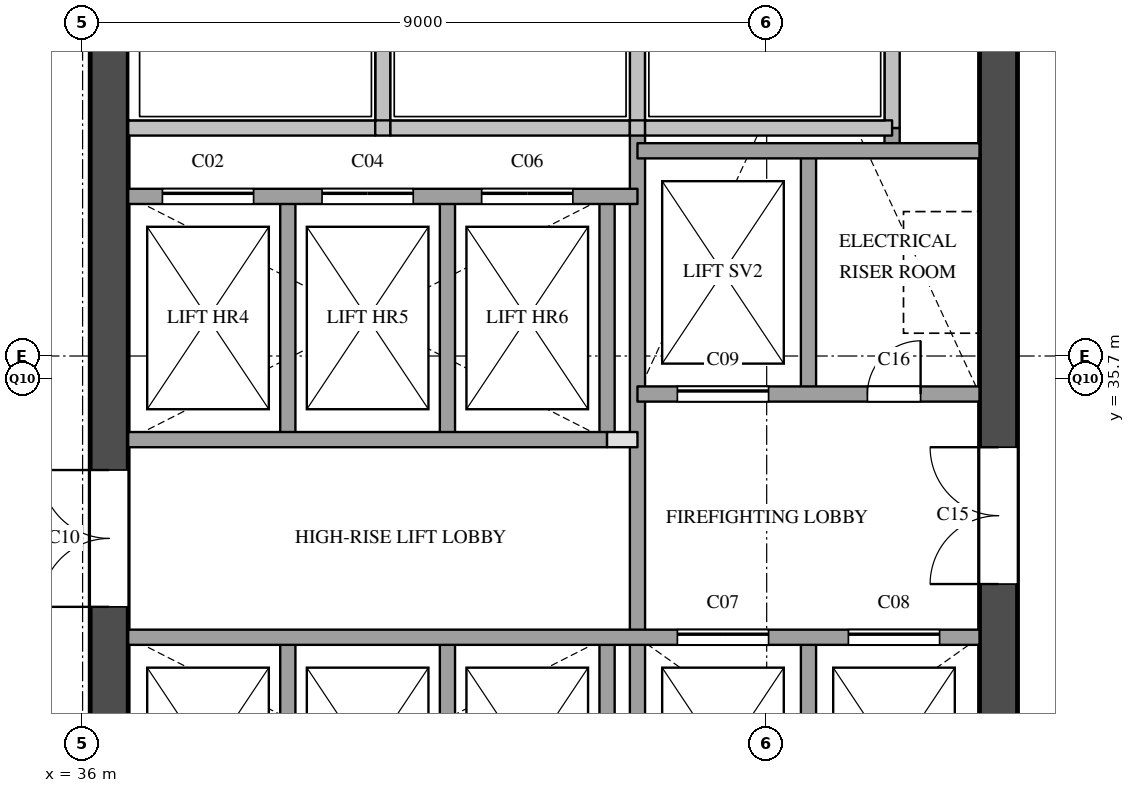
"""IFC4 building model, lengths in metres.
Left out: names, types, materials, properties, quantities, classifications, styles, units other than length and angle.
Written with IfcOpenShell. Run it as: python <this file> out.ifc"""

import sys

from ifc_helpers import new_model, si_unit, direction, frame, frame_2d, origin, place, context, subcontext, project, spatial, rectangle, extrude, element, fill, save


model = new_model("IFC4")
c1 = context("Model", 3, precision=1e-05, world=origin(), true_north=direction((0.0, 1.0)))
c2 = subcontext(c1, "Body", "Model", "MODEL_VIEW")
j1 = project(units=[si_unit("LENGTHUNIT", "METRE"), si_unit("PLANEANGLEUNIT", "RADIAN")], contexts=[c1])
p1 = place(None, origin())
s1 = spatial("IfcSite", under=j1, at=p1, CompositionType="ELEMENT")
p2 = place(p1, origin())
s2 = spatial("IfcBuilding", under=s1, at=p2, CompositionType="ELEMENT")
p3 = place(p2, frame((0.0, 0.0, 154.4)))
s3 = spatial("IfcBuildingStorey", under=s2, at=p3, CompositionType="ELEMENT", Elevation=154.4)
p4 = place(p3, frame((36.35, 29.1, 0.0), z_axis=(0.0, 0.0, 1.0), x_axis=(0.0, 1.0, 0.0)))
e1 = element("IfcWall", 1, at=p4, inside=s3, PredefinedType="SHEAR", context=c2, shape_type="SweptSolid", body=[
    extrude(rectangle(XDim=20.3, YDim=0.5, at=frame_2d((10.15, 0.0))), origin(), (0.0, 0.0, 1.0), 3.6),
])
p5 = place(p4, frame((3.6, 0.0, 0.0)))
e2 = element("IfcOpeningElement", 2, at=p5, cuts=e1, PredefinedType="OPENING", context=c2, shape_type="SweptSolid", body=[
    extrude(rectangle(XDim=1.8, YDim=2.1, at=frame_2d((0.9, 1.05))), frame((0.0, 0.26, 0.0), z_axis=(0.0, -1.0, 0.0), x_axis=(1.0, 0.0, 0.0)), (0.0, 0.0, 1.0), 0.52),
])
p6 = place(p4, frame((16.4, 0.0, 0.0)))
e3 = element("IfcOpeningElement", 3, at=p6, cuts=e1, PredefinedType="OPENING", context=c2, shape_type="SweptSolid", body=[
    extrude(rectangle(XDim=1.0, YDim=2.1, at=frame_2d((0.5, 1.05))), frame((0.0, 0.26, 0.0), z_axis=(0.0, -1.0, 0.0), x_axis=(1.0, 0.0, 0.0)), (0.0, 0.0, 1.0), 0.52),
])
p7 = place(p3, frame((48.05, 29.1, 0.0), z_axis=(0.0, 0.0, 1.0), x_axis=(0.0, 1.0, 0.0)))
e4 = element("IfcWall", 4, at=p7, inside=s3, PredefinedType="SHEAR", context=c2, shape_type="SweptSolid", body=[
    extrude(rectangle(XDim=20.3, YDim=0.5, at=frame_2d((10.15, 0.0))), origin(), (0.0, 0.0, 1.0), 3.6),
])
p8 = place(p7, frame((12.5, 0.0, 0.0)))
e5 = element("IfcOpeningElement", 5, at=p8, cuts=e4, PredefinedType="OPENING", context=c2, shape_type="SweptSolid", body=[
    extrude(rectangle(XDim=0.7, YDim=2.1, at=frame_2d((0.35, 1.05))), frame((0.0, 0.26, 0.0), z_axis=(0.0, -1.0, 0.0), x_axis=(1.0, 0.0, 0.0)), (0.0, 0.0, 1.0), 0.52),
])
p9 = place(p7, frame((3.9, 0.0, 0.0)))
e6 = element("IfcOpeningElement", 6, at=p9, cuts=e4, PredefinedType="OPENING", context=c2, shape_type="SweptSolid", body=[
    extrude(rectangle(XDim=1.8, YDim=2.1, at=frame_2d((0.9, 1.05))), frame((0.0, 0.26, 0.0), z_axis=(0.0, -1.0, 0.0), x_axis=(1.0, 0.0, 0.0)), (0.0, 0.0, 1.0), 0.52),
])
p10 = place(p3, frame((38.7, 29.1, 0.0), z_axis=(0.0, 0.0, 1.0), x_axis=(0.0, 1.0, 0.0)))
e7 = element("IfcWall", 7, at=p10, inside=s3, PredefinedType="SOLIDWALL", context=c2, shape_type="SweptSolid", body=[
    extrude(rectangle(XDim=3.2, YDim=0.2, at=frame_2d((1.6, 0.0))), origin(), (0.0, 0.0, 1.0), 3.6),
])
p11 = place(p3, frame((38.7, 34.9, 0.0), z_axis=(0.0, 0.0, 1.0), x_axis=(0.0, 1.0, 0.0)))
e8 = element("IfcWall", 8, at=p11, inside=s3, PredefinedType="SOLIDWALL", context=c2, shape_type="SweptSolid", body=[
    extrude(rectangle(XDim=3.2, YDim=0.2, at=frame_2d((1.6, 0.0))), origin(), (0.0, 0.0, 1.0), 3.6),
])
p12 = place(p3, frame((39.95, 39.0, 0.0), z_axis=(0.0, 0.0, 1.0), x_axis=(0.0, 1.0, 0.0)))
e9 = element("IfcWall", 9, at=p12, inside=s3, PredefinedType="SOLIDWALL", context=c2, shape_type="SweptSolid", body=[
    extrude(rectangle(XDim=1.78, YDim=0.2, at=frame_2d((0.89, 0.0))), origin(), (0.0, 0.0, 1.0), 3.6),
])
p13 = place(p3, frame((40.8, 29.1, 0.0), z_axis=(0.0, 0.0, 1.0), x_axis=(0.0, 1.0, 0.0)))
e10 = element("IfcWall", 10, at=p13, inside=s3, PredefinedType="SOLIDWALL", context=c2, shape_type="SweptSolid", body=[
    extrude(rectangle(XDim=3.2, YDim=0.2, at=frame_2d((1.6, 0.0))), origin(), (0.0, 0.0, 1.0), 3.6),
])
p14 = place(p3, frame((40.8, 34.9, 0.0), z_axis=(0.0, 0.0, 1.0), x_axis=(0.0, 1.0, 0.0)))
e11 = element("IfcWall", 11, at=p14, inside=s3, PredefinedType="SOLIDWALL", context=c2, shape_type="SweptSolid", body=[
    extrude(rectangle(XDim=3.2, YDim=0.2, at=frame_2d((1.6, 0.0))), origin(), (0.0, 0.0, 1.0), 3.6),
])
p15 = place(p3, frame((42.9, 29.1, 0.0), z_axis=(0.0, 0.0, 1.0), x_axis=(0.0, 1.0, 0.0)))
e12 = element("IfcWall", 12, at=p15, inside=s3, PredefinedType="SOLIDWALL", context=c2, shape_type="SweptSolid", body=[
    extrude(rectangle(XDim=3.2, YDim=0.2, at=frame_2d((1.6, 0.0))), origin(), (0.0, 0.0, 1.0), 3.6),
])
p16 = place(p3, frame((42.9, 34.9, 0.0), z_axis=(0.0, 0.0, 1.0), x_axis=(0.0, 1.0, 0.0)))
e13 = element("IfcWall", 13, at=p16, inside=s3, PredefinedType="SOLIDWALL", context=c2, shape_type="SweptSolid", body=[
    extrude(rectangle(XDim=3.2, YDim=0.2, at=frame_2d((1.6, 0.0))), origin(), (0.0, 0.0, 1.0), 3.6),
])
p17 = place(p3, frame((43.3, 29.1, 0.0), z_axis=(0.0, 0.0, 1.0), x_axis=(0.0, 1.0, 0.0)))
e14 = element("IfcWall", 14, at=p17, inside=s3, PredefinedType="SOLIDWALL", context=c2, shape_type="SweptSolid", body=[
    extrude(rectangle(XDim=9.9, YDim=0.2, at=frame_2d((4.95, 0.0))), origin(), (0.0, 0.0, 1.0), 3.6),
])
p18 = place(p3, frame((43.3, 39.0, 0.0), z_axis=(0.0, 0.0, 1.0), x_axis=(0.0, 1.0, 0.0)))
e15 = element("IfcWall", 15, at=p18, inside=s3, PredefinedType="SOLIDWALL", context=c2, shape_type="SweptSolid", body=[
    extrude(rectangle(XDim=1.78, YDim=0.2, at=frame_2d((0.89, 0.0))), origin(), (0.0, 0.0, 1.0), 3.6),
])
for number, where, z_axis, x_axis in (
    (16, (45.55, 29.1, 0.0), (0.0, 0.0, 1.0), (0.0, 1.0, 0.0)),
    (17, (45.55, 35.5, 0.0), (0.0, 0.0, 1.0), (0.0, 1.0, 0.0)),
):
    element("IfcWall", number, at=place(p3, frame(where, z_axis=z_axis, x_axis=x_axis)), inside=s3, PredefinedType="SOLIDWALL", context=c2, shape_type="SweptSolid", body=[
        extrude(rectangle(XDim=3.2, YDim=0.2, at=frame_2d((1.6, 0.0))), origin(), (0.0, 0.0, 1.0), 3.6),
    ])
p19 = place(p3, frame((46.65, 38.7, 0.0), z_axis=(0.0, 0.0, 1.0), x_axis=(0.0, 1.0, 0.0)))
e18 = element("IfcWall", 18, at=p19, inside=s3, PredefinedType="SOLIDWALL", context=c2, shape_type="SweptSolid", body=[
    extrude(rectangle(XDim=0.3, YDim=0.2, at=frame_2d((0.15, 0.0))), origin(), (0.0, 0.0, 1.0), 3.6),
])
p20 = place(p3, frame((46.65, 39.0, 0.0), z_axis=(0.0, 0.0, 1.0), x_axis=(0.0, 1.0, 0.0)))
e19 = element("IfcWall", 19, at=p20, inside=s3, PredefinedType="SOLIDWALL", context=c2, shape_type="SweptSolid", body=[
    extrude(rectangle(XDim=1.78, YDim=0.2, at=frame_2d((0.89, 0.0))), origin(), (0.0, 0.0, 1.0), 3.6),
])
p21 = place(p3, frame((36.6, 32.3, 0.0), z_axis=(0.0, 0.0, 1.0), x_axis=(1.0, 0.0, 0.0)))
e20 = element("IfcWall", 20, at=p21, inside=s3, PredefinedType="SOLIDWALL", context=c2, shape_type="SweptSolid", body=[
    extrude(rectangle(XDim=11.2, YDim=0.2, at=frame_2d((5.6, 0.0))), origin(), (0.0, 0.0, 1.0), 3.6),
])
p22 = place(p21, frame((7.225, 0.0, 0.0)))
e21 = element("IfcOpeningElement", 21, at=p22, cuts=e20, PredefinedType="OPENING", context=c2, shape_type="SweptSolid", body=[
    extrude(rectangle(XDim=1.2, YDim=2.1, at=frame_2d((0.6, 1.05))), frame((0.0, 0.11, 0.0), z_axis=(0.0, -1.0, 0.0), x_axis=(1.0, 0.0, 0.0)), (0.0, 0.0, 1.0), 0.22),
])
p23 = place(p21, frame((9.475, 0.0, 0.0)))
e22 = element("IfcOpeningElement", 22, at=p23, cuts=e20, PredefinedType="OPENING", context=c2, shape_type="SweptSolid", body=[
    extrude(rectangle(XDim=1.2, YDim=2.1, at=frame_2d((0.6, 1.05))), frame((0.0, 0.11, 0.0), z_axis=(0.0, -1.0, 0.0), x_axis=(1.0, 0.0, 0.0)), (0.0, 0.0, 1.0), 0.22),
])
p24 = place(p3, frame((42.9, 34.9, 0.0), z_axis=(0.0, 0.0, 1.0), x_axis=(1.0, 0.0, 0.0)))
e23 = element("IfcWall", 23, at=p24, inside=s3, PredefinedType="PARTITIONING", context=c2, shape_type="SweptSolid", body=[
    extrude(rectangle(XDim=0.4, YDim=0.2, at=frame_2d((0.2, 0.0))), origin(), (0.0, 0.0, 1.0), 3.6),
])
p25 = place(p3, frame((36.6, 34.9, 0.0), z_axis=(0.0, 0.0, 1.0), x_axis=(1.0, 0.0, 0.0)))
e24 = element("IfcWall", 24, at=p25, inside=s3, PredefinedType="SOLIDWALL", context=c2, shape_type="SweptSolid", body=[
    extrude(rectangle(XDim=6.3, YDim=0.2, at=frame_2d((3.15, 0.0))), origin(), (0.0, 0.0, 1.0), 3.6),
])
p26 = place(p3, frame((43.3, 35.5, 0.0), z_axis=(0.0, 0.0, 1.0), x_axis=(1.0, 0.0, 0.0)))
e25 = element("IfcWall", 25, at=p26, inside=s3, PredefinedType="SOLIDWALL", context=c2, shape_type="SweptSolid", body=[
    extrude(rectangle(XDim=4.5, YDim=0.2, at=frame_2d((2.25, 0.0))), origin(), (0.0, 0.0, 1.0), 3.6),
])
p27 = place(p26, frame((0.525, 0.0, 0.0)))
e26 = element("IfcOpeningElement", 26, at=p27, cuts=e25, PredefinedType="OPENING", context=c2, shape_type="SweptSolid", body=[
    extrude(rectangle(XDim=1.2, YDim=2.1, at=frame_2d((0.6, 1.05))), frame((0.0, 0.11, 0.0), z_axis=(0.0, -1.0, 0.0), x_axis=(1.0, 0.0, 0.0)), (0.0, 0.0, 1.0), 0.22),
])
p28 = place(p26, frame((3.025, 0.0, 0.0)))
e27 = element("IfcOpeningElement", 27, at=p28, cuts=e25, PredefinedType="OPENING", context=c2, shape_type="SweptSolid", body=[
    extrude(rectangle(XDim=0.7, YDim=2.1, at=frame_2d((0.35, 1.05))), frame((0.0, 0.11, 0.0), z_axis=(0.0, -1.0, 0.0), x_axis=(1.0, 0.0, 0.0)), (0.0, 0.0, 1.0), 0.22),
])
p29 = place(p3, frame((36.6, 38.1, 0.0), z_axis=(0.0, 0.0, 1.0), x_axis=(1.0, 0.0, 0.0)))
e28 = element("IfcWall", 28, at=p29, inside=s3, PredefinedType="SOLIDWALL", context=c2, shape_type="SweptSolid", body=[
    extrude(rectangle(XDim=6.7, YDim=0.2, at=frame_2d((3.35, 0.0))), origin(), (0.0, 0.0, 1.0), 3.6),
])
p30 = place(p29, frame((0.45, 0.0, 0.0)))
e29 = element("IfcOpeningElement", 29, at=p30, cuts=e28, PredefinedType="OPENING", context=c2, shape_type="SweptSolid", body=[
    extrude(rectangle(XDim=1.2, YDim=2.1, at=frame_2d((0.6, 1.05))), frame((0.0, 0.11, 0.0), z_axis=(0.0, -1.0, 0.0), x_axis=(1.0, 0.0, 0.0)), (0.0, 0.0, 1.0), 0.22),
])
p31 = place(p29, frame((2.55, 0.0, 0.0)))
e30 = element("IfcOpeningElement", 30, at=p31, cuts=e28, PredefinedType="OPENING", context=c2, shape_type="SweptSolid", body=[
    extrude(rectangle(XDim=1.2, YDim=2.1, at=frame_2d((0.6, 1.05))), frame((0.0, 0.11, 0.0), z_axis=(0.0, -1.0, 0.0), x_axis=(1.0, 0.0, 0.0)), (0.0, 0.0, 1.0), 0.22),
])
p32 = place(p29, frame((4.65, 0.0, 0.0)))
e31 = element("IfcOpeningElement", 31, at=p32, cuts=e28, PredefinedType="OPENING", context=c2, shape_type="SweptSolid", body=[
    extrude(rectangle(XDim=1.2, YDim=2.1, at=frame_2d((0.6, 1.05))), frame((0.0, 0.11, 0.0), z_axis=(0.0, -1.0, 0.0), x_axis=(1.0, 0.0, 0.0)), (0.0, 0.0, 1.0), 0.22),
])
p33 = place(p3, frame((43.3, 38.7, 0.0), z_axis=(0.0, 0.0, 1.0), x_axis=(1.0, 0.0, 0.0)))
e32 = element("IfcWall", 32, at=p33, inside=s3, PredefinedType="SOLIDWALL", context=c2, shape_type="SweptSolid", body=[
    extrude(rectangle(XDim=4.5, YDim=0.2, at=frame_2d((2.25, 0.0))), origin(), (0.0, 0.0, 1.0), 3.6),
])
p34 = place(p3, frame((36.6, 39.0, 0.0), z_axis=(0.0, 0.0, 1.0), x_axis=(1.0, 0.0, 0.0)))
e33 = element("IfcWall", 33, at=p34, inside=s3, PredefinedType="SOLIDWALL", context=c2, shape_type="SweptSolid", body=[
    extrude(rectangle(XDim=3.25, YDim=0.2, at=frame_2d((1.625, 0.0))), origin(), (0.0, 0.0, 1.0), 3.6),
])
p35 = place(p3, frame((39.85, 39.0, 0.0), z_axis=(0.0, 0.0, 1.0), x_axis=(1.0, 0.0, 0.0)))
e34 = element("IfcWall", 34, at=p35, inside=s3, PredefinedType="SOLIDWALL", context=c2, shape_type="SweptSolid", body=[
    extrude(rectangle(XDim=0.2, YDim=0.2, at=frame_2d((0.1, 0.0))), origin(), (0.0, 0.0, 1.0), 3.6),
])
p36 = place(p3, frame((40.05, 39.0, 0.0), z_axis=(0.0, 0.0, 1.0), x_axis=(1.0, 0.0, 0.0)))
e35 = element("IfcWall", 35, at=p36, inside=s3, PredefinedType="SOLIDWALL", context=c2, shape_type="SweptSolid", body=[
    extrude(rectangle(XDim=3.15, YDim=0.2, at=frame_2d((1.575, 0.0))), origin(), (0.0, 0.0, 1.0), 3.6),
])
p37 = place(p3, frame((43.2, 39.0, 0.0), z_axis=(0.0, 0.0, 1.0), x_axis=(1.0, 0.0, 0.0)))
e36 = element("IfcWall", 36, at=p37, inside=s3, PredefinedType="SOLIDWALL", context=c2, shape_type="SweptSolid", body=[
    extrude(rectangle(XDim=0.2, YDim=0.2, at=frame_2d((0.1, 0.0))), origin(), (0.0, 0.0, 1.0), 3.6),
])
p38 = place(p3, frame((43.4, 39.0, 0.0), z_axis=(0.0, 0.0, 1.0), x_axis=(1.0, 0.0, 0.0)))
e37 = element("IfcWall", 37, at=p38, inside=s3, PredefinedType="SOLIDWALL", context=c2, shape_type="SweptSolid", body=[
    extrude(rectangle(XDim=3.25, YDim=0.2, at=frame_2d((1.625, 0.0))), origin(), (0.0, 0.0, 1.0), 3.6),
])
p39 = place(p30, origin())
e38 = element("IfcDoor", 38, at=p39, inside=s3, OperationType="SLIDING_TO_LEFT", PredefinedType="DOOR", context=c2, shape_type="SweptSolid", body=[
    extrude(rectangle(XDim=1.2, YDim=2.1, at=frame_2d((0.6, 1.05))), frame((0.0, 0.025, 0.0), z_axis=(0.0, -1.0, 0.0), x_axis=(1.0, 0.0, 0.0)), (0.0, 0.0, 1.0), 0.05),
])
fill(e29, e38)
p40 = place(p31, origin())
e39 = element("IfcDoor", 39, at=p40, inside=s3, OperationType="SLIDING_TO_LEFT", PredefinedType="DOOR", context=c2, shape_type="SweptSolid", body=[
    extrude(rectangle(XDim=1.2, YDim=2.1, at=frame_2d((0.6, 1.05))), frame((0.0, 0.025, 0.0), z_axis=(0.0, -1.0, 0.0), x_axis=(1.0, 0.0, 0.0)), (0.0, 0.0, 1.0), 0.05),
])
fill(e30, e39)
p41 = place(p32, origin())
e40 = element("IfcDoor", 40, at=p41, inside=s3, OperationType="SLIDING_TO_LEFT", PredefinedType="DOOR", context=c2, shape_type="SweptSolid", body=[
    extrude(rectangle(XDim=1.2, YDim=2.1, at=frame_2d((0.6, 1.05))), frame((0.0, 0.025, 0.0), z_axis=(0.0, -1.0, 0.0), x_axis=(1.0, 0.0, 0.0)), (0.0, 0.0, 1.0), 0.05),
])
fill(e31, e40)
p42 = place(p22, origin())
e41 = element("IfcDoor", 41, at=p42, inside=s3, OperationType="SLIDING_TO_LEFT", PredefinedType="DOOR", context=c2, shape_type="SweptSolid", body=[
    extrude(rectangle(XDim=1.2, YDim=2.1, at=frame_2d((0.6, 1.05))), frame((0.0, 0.025, 0.0), z_axis=(0.0, -1.0, 0.0), x_axis=(1.0, 0.0, 0.0)), (0.0, 0.0, 1.0), 0.05),
])
fill(e21, e41)
p43 = place(p23, origin())
e42 = element("IfcDoor", 42, at=p43, inside=s3, OperationType="SLIDING_TO_LEFT", PredefinedType="DOOR", context=c2, shape_type="SweptSolid", body=[
    extrude(rectangle(XDim=1.2, YDim=2.1, at=frame_2d((0.6, 1.05))), frame((0.0, 0.025, 0.0), z_axis=(0.0, -1.0, 0.0), x_axis=(1.0, 0.0, 0.0)), (0.0, 0.0, 1.0), 0.05),
])
fill(e22, e42)
p44 = place(p27, origin())
e43 = element("IfcDoor", 43, at=p44, inside=s3, OperationType="SLIDING_TO_LEFT", PredefinedType="DOOR", context=c2, shape_type="SweptSolid", body=[
    extrude(rectangle(XDim=1.2, YDim=2.1, at=frame_2d((0.6, 1.05))), frame((0.0, 0.025, 0.0), z_axis=(0.0, -1.0, 0.0), x_axis=(1.0, 0.0, 0.0)), (0.0, 0.0, 1.0), 0.05),
])
fill(e26, e43)
p45 = place(p5, origin())
e44 = element("IfcDoor", 44, at=p45, inside=s3, OperationType="DOUBLE_DOOR_SINGLE_SWING", PredefinedType="DOOR", context=c2, shape_type="SweptSolid", body=[
    extrude(rectangle(XDim=1.8, YDim=2.1, at=frame_2d((0.9, 1.05))), frame((0.0, 0.025, 0.0), z_axis=(0.0, -1.0, 0.0), x_axis=(1.0, 0.0, 0.0)), (0.0, 0.0, 1.0), 0.05),
])
fill(e2, e44)
p46 = place(p9, origin())
e45 = element("IfcDoor", 45, at=p46, inside=s3, OperationType="DOUBLE_DOOR_SINGLE_SWING", PredefinedType="DOOR", context=c2, shape_type="SweptSolid", body=[
    extrude(rectangle(XDim=1.8, YDim=2.1, at=frame_2d((0.9, 1.05))), frame((0.0, 0.025, 0.0), z_axis=(0.0, -1.0, 0.0), x_axis=(1.0, 0.0, 0.0)), (0.0, 0.0, 1.0), 0.05),
])
fill(e6, e45)
p47 = place(p28, origin())
e46 = element("IfcDoor", 46, at=p47, inside=s3, OperationType="SINGLE_SWING_RIGHT", PredefinedType="DOOR", context=c2, shape_type="SweptSolid", body=[
    extrude(rectangle(XDim=0.7, YDim=2.1, at=frame_2d((0.35, 1.05))), frame((0.0, 0.025, 0.0), z_axis=(0.0, -1.0, 0.0), x_axis=(1.0, 0.0, 0.0)), (0.0, 0.0, 1.0), 0.05),
])
fill(e27, e46)
save(model, sys.argv[1])
